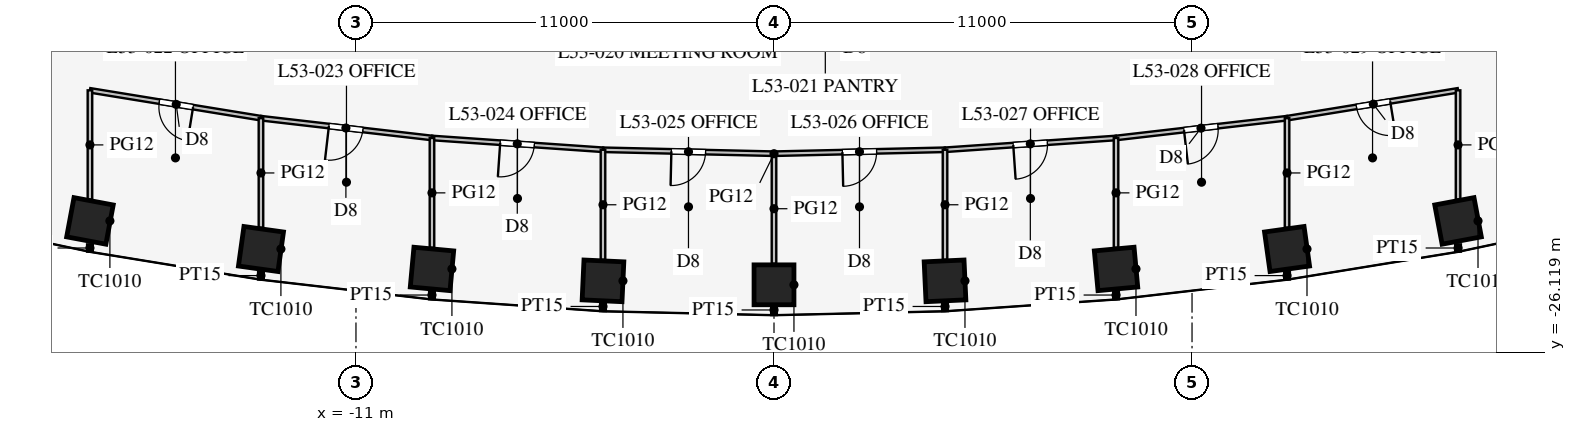
"""IFC4 building model, lengths in metres.
Left out: names, types, materials, properties, quantities, classifications, styles, units other than length and angle.
Written with IfcOpenShell. Run it as: python <this file> out.ifc"""

import sys

from ifc_helpers import new_model, si_unit, direction, frame, frame_2d, origin, origin_2d, place, context, subcontext, project, spatial, rectangle, extrude, element, fill, save


model = new_model("IFC4")
c1 = context("Model", 3, precision=1e-05, world=origin(), true_north=direction((0.0, 1.0)))
c2 = subcontext(c1, "Body", "Model", "MODEL_VIEW")
j1 = project(units=[si_unit("LENGTHUNIT", "METRE"), si_unit("PLANEANGLEUNIT", "RADIAN")], contexts=[c1])
p1 = place(None, origin())
s1 = spatial("IfcSite", under=j1, at=p1, CompositionType="ELEMENT")
p2 = place(p1, origin())
s2 = spatial("IfcBuilding", under=s1, at=p2, CompositionType="ELEMENT")
p3 = place(p2, frame((0.0, 0.0, 231.7)))
s3 = spatial("IfcBuildingStorey", under=s2, at=p3, CompositionType="ELEMENT", Elevation=231.7)
for number, where, z_axis, x_axis in (
    (1, (-18.0, -22.669, 0.0), (0.0, 0.0, 1.0), (0.983, -0.184, 0.0)),
    (2, (-13.5, -23.408, 0.0), (0.0, 0.0, 1.0), (0.99, -0.138, 0.0)),
    (3, (-9.0, -23.933, 0.0), (0.0, 0.0, 1.0), (0.996, -0.092, 0.0)),
    (4, (-4.5, -24.246, 0.0), (0.0, 0.0, 1.0), (0.999, -0.046, 0.0)),
    (5, (0.0, -24.351, 0.0), (0.0, 0.0, 1.0), (1.0, 0.0, 0.0)),
    (6, (4.5, -24.246, 0.0), (0.0, 0.0, 1.0), (0.999, 0.046, 0.0)),
    (7, (9.0, -23.933, 0.0), (0.0, 0.0, 1.0), (0.996, 0.092, 0.0)),
    (8, (13.5, -23.408, 0.0), (0.0, 0.0, 1.0), (0.99, 0.138, 0.0)),
    (9, (18.0, -22.669, 0.0), (0.0, 0.0, 1.0), (0.983, 0.184, 0.0)),
):
    element("IfcColumn", number, at=place(p3, frame(where, z_axis=z_axis, x_axis=x_axis)), inside=s3, PredefinedType="COLUMN", context=c2, shape_type="SweptSolid", body=[
        extrude(rectangle(XDim=1.05, YDim=1.05, at=origin_2d()), origin(), (0.0, 0.0, 1.0), 4.2),
    ])
p4 = place(p3, frame((13.5, -24.005, 0.0), z_axis=(0.0, 0.0, 1.0), x_axis=(0.0, -1.0, 0.0)))
e10 = element("IfcWall", 10, at=p4, inside=s3, PredefinedType="PARTITIONING", context=c2, shape_type="SweptSolid", body=[
    extrude(rectangle(XDim=0.206, YDim=0.15, at=frame_2d((0.103, 0.0))), origin(), (0.0, 0.0, 1.0), 2.9),
])
p5 = place(p3, frame((18.0, -23.286, 0.0), z_axis=(0.0, 0.0, 1.0), x_axis=(0.0, -1.0, 0.0)))
e11 = element("IfcWall", 11, at=p5, inside=s3, PredefinedType="PARTITIONING", context=c2, shape_type="SweptSolid", body=[
    extrude(rectangle(XDim=0.192, YDim=0.15, at=frame_2d((0.096, 0.0))), origin(), (0.0, 0.0, 1.0), 2.9),
])
p6 = place(p3, frame((4.5, -24.799, 0.0), z_axis=(0.0, 0.0, 1.0), x_axis=(0.0, -1.0, 0.0)))
e12 = element("IfcWall", 12, at=p6, inside=s3, PredefinedType="PARTITIONING", context=c2, shape_type="SweptSolid", body=[
    extrude(rectangle(XDim=0.243, YDim=0.15, at=frame_2d((0.122, 0.0))), origin(), (0.0, 0.0, 1.0), 2.9),
])
p7 = place(p3, frame((9.0, -24.508, 0.0), z_axis=(0.0, 0.0, 1.0), x_axis=(0.0, -1.0, 0.0)))
e13 = element("IfcWall", 13, at=p7, inside=s3, PredefinedType="PARTITIONING", context=c2, shape_type="SweptSolid", body=[
    extrude(rectangle(XDim=0.223, YDim=0.15, at=frame_2d((0.112, 0.0))), origin(), (0.0, 0.0, 1.0), 2.9),
])
p8 = place(p3, frame((0.0, -24.88, 0.0), z_axis=(0.0, 0.0, 1.0), x_axis=(0.0, -1.0, 0.0)))
e14 = element("IfcWall", 14, at=p8, inside=s3, PredefinedType="PARTITIONING", context=c2, shape_type="SweptSolid", body=[
    extrude(rectangle(XDim=0.266, YDim=0.15, at=frame_2d((0.133, 0.0))), origin(), (0.0, 0.0, 1.0), 2.9),
])
p9 = place(p3, frame((-13.5, -24.005, 0.0), z_axis=(0.0, 0.0, 1.0), x_axis=(0.0, -1.0, 0.0)))
e15 = element("IfcWall", 15, at=p9, inside=s3, PredefinedType="PARTITIONING", context=c2, shape_type="SweptSolid", body=[
    extrude(rectangle(XDim=0.206, YDim=0.15, at=frame_2d((0.103, 0.0))), origin(), (0.0, 0.0, 1.0), 2.9),
])
p10 = place(p3, frame((-18.0, -23.286, 0.0), z_axis=(0.0, 0.0, 1.0), x_axis=(0.0, -1.0, 0.0)))
e16 = element("IfcWall", 16, at=p10, inside=s3, PredefinedType="PARTITIONING", context=c2, shape_type="SweptSolid", body=[
    extrude(rectangle(XDim=0.192, YDim=0.15, at=frame_2d((0.096, 0.0))), origin(), (0.0, 0.0, 1.0), 2.9),
])
p11 = place(p3, frame((-4.5, -24.799, 0.0), z_axis=(0.0, 0.0, 1.0), x_axis=(0.0, -1.0, 0.0)))
e17 = element("IfcWall", 17, at=p11, inside=s3, PredefinedType="PARTITIONING", context=c2, shape_type="SweptSolid", body=[
    extrude(rectangle(XDim=0.243, YDim=0.15, at=frame_2d((0.122, 0.0))), origin(), (0.0, 0.0, 1.0), 2.9),
])
p12 = place(p3, frame((-9.0, -24.508, 0.0), z_axis=(0.0, 0.0, 1.0), x_axis=(0.0, -1.0, 0.0)))
e18 = element("IfcWall", 18, at=p12, inside=s3, PredefinedType="PARTITIONING", context=c2, shape_type="SweptSolid", body=[
    extrude(rectangle(XDim=0.223, YDim=0.15, at=frame_2d((0.112, 0.0))), origin(), (0.0, 0.0, 1.0), 2.9),
])
p13 = place(p3, frame((0.0, -20.901, 0.0), z_axis=(0.0, 0.0, 1.0), x_axis=(0.99973552509, 0.022997388381, 0.0)))
e19 = element("IfcWall", 19, at=p13, inside=s3, PredefinedType="PARTITIONING", context=c2, shape_type="SweptSolid", body=[
    extrude(rectangle(XDim=4.501, YDim=0.12, at=frame_2d((2.25, 0.0))), origin(), (0.0, 0.0, 1.0), 2.9),
])
p14 = place(p13, frame((1.8, 0.0, 0.15)))
e20 = element("IfcOpeningElement", 20, at=p14, cuts=e19, PredefinedType="OPENING", context=c2, shape_type="SweptSolid", body=[
    extrude(rectangle(XDim=0.9, YDim=2.1, at=frame_2d((0.45, 1.05))), frame((0.0, 0.07, 0.0), z_axis=(0.0, -1.0, 0.0), x_axis=(1.0, 0.0, 0.0)), (0.0, 0.0, 1.0), 0.14),
])
p15 = place(p3, frame((13.5, -19.966, 0.0), z_axis=(0.0, 0.0, 1.0), x_axis=(0.986986525477, 0.160802980469, 0.0)))
e21 = element("IfcWall", 21, at=p15, inside=s3, PredefinedType="PARTITIONING", context=c2, shape_type="SweptSolid", body=[
    extrude(rectangle(XDim=4.559, YDim=0.12, at=frame_2d((2.28, 0.0))), origin(), (0.0, 0.0, 1.0), 2.9),
])
p16 = place(p15, frame((1.85, 0.0, 0.15)))
e22 = element("IfcOpeningElement", 22, at=p16, cuts=e21, PredefinedType="OPENING", context=c2, shape_type="SweptSolid", body=[
    extrude(rectangle(XDim=0.9, YDim=2.1, at=frame_2d((0.45, 1.05))), frame((0.0, 0.07, 0.0), z_axis=(0.0, -1.0, 0.0), x_axis=(1.0, 0.0, 0.0)), (0.0, 0.0, 1.0), 0.14),
])
p17 = place(p3, frame((4.5, -20.797, 0.0), z_axis=(0.0, 0.0, 1.0), x_axis=(0.997623533978, 0.068900540297, 0.0)))
e23 = element("IfcWall", 23, at=p17, inside=s3, PredefinedType="PARTITIONING", context=c2, shape_type="SweptSolid", body=[
    extrude(rectangle(XDim=4.511, YDim=0.12, at=frame_2d((2.255, 0.0))), origin(), (0.0, 0.0, 1.0), 2.9),
])
p18 = place(p17, frame((1.8, 0.0, 0.15)))
e24 = element("IfcOpeningElement", 24, at=p18, cuts=e23, PredefinedType="OPENING", context=c2, shape_type="SweptSolid", body=[
    extrude(rectangle(XDim=0.9, YDim=2.1, at=frame_2d((0.45, 1.05))), frame((0.0, 0.07, 0.0), z_axis=(0.0, -1.0, 0.0), x_axis=(1.0, 0.0, 0.0)), (0.0, 0.0, 1.0), 0.14),
])
p19 = place(p3, frame((9.0, -20.486, 0.0), z_axis=(0.0, 0.0, 1.0), x_axis=(0.993382946625, 0.114849124309, 0.0)))
e25 = element("IfcWall", 25, at=p19, inside=s3, PredefinedType="PARTITIONING", context=c2, shape_type="SweptSolid", body=[
    extrude(rectangle(XDim=4.53, YDim=0.12, at=frame_2d((2.265, 0.0))), origin(), (0.0, 0.0, 1.0), 2.9),
])
p20 = place(p19, frame((1.8, 0.0, 0.15)))
e26 = element("IfcOpeningElement", 26, at=p20, cuts=e25, PredefinedType="OPENING", context=c2, shape_type="SweptSolid", body=[
    extrude(rectangle(XDim=0.9, YDim=2.1, at=frame_2d((0.45, 1.05))), frame((0.0, 0.07, 0.0), z_axis=(0.0, -1.0, 0.0), x_axis=(1.0, 0.0, 0.0)), (0.0, 0.0, 1.0), 0.14),
])
p21 = place(p3, frame((-13.5, -19.966, 0.0), z_axis=(0.0, 0.0, 1.0), x_axis=(0.993382946625, -0.114849124309, 0.0)))
e27 = element("IfcWall", 27, at=p21, inside=s3, PredefinedType="PARTITIONING", context=c2, shape_type="SweptSolid", body=[
    extrude(rectangle(XDim=4.53, YDim=0.12, at=frame_2d((2.265, 0.0))), origin(), (0.0, 0.0, 1.0), 2.9),
])
p22 = place(p21, frame((1.8, 0.0, 0.15)))
e28 = element("IfcOpeningElement", 28, at=p22, cuts=e27, PredefinedType="OPENING", context=c2, shape_type="SweptSolid", body=[
    extrude(rectangle(XDim=0.9, YDim=2.1, at=frame_2d((0.45, 1.05))), frame((0.0, 0.07, 0.0), z_axis=(0.0, -1.0, 0.0), x_axis=(1.0, 0.0, 0.0)), (0.0, 0.0, 1.0), 0.14),
])
p23 = place(p3, frame((-18.0, -19.233, 0.0), z_axis=(0.0, 0.0, 1.0), x_axis=(0.986986525477, -0.160802980469, 0.0)))
e29 = element("IfcWall", 29, at=p23, inside=s3, PredefinedType="PARTITIONING", context=c2, shape_type="SweptSolid", body=[
    extrude(rectangle(XDim=4.559, YDim=0.12, at=frame_2d((2.28, 0.0))), origin(), (0.0, 0.0, 1.0), 2.9),
])
p24 = place(p23, frame((1.85, 0.0, 0.15)))
e30 = element("IfcOpeningElement", 30, at=p24, cuts=e29, PredefinedType="OPENING", context=c2, shape_type="SweptSolid", body=[
    extrude(rectangle(XDim=0.9, YDim=2.1, at=frame_2d((0.45, 1.05))), frame((0.0, 0.07, 0.0), z_axis=(0.0, -1.0, 0.0), x_axis=(1.0, 0.0, 0.0)), (0.0, 0.0, 1.0), 0.14),
])
p25 = place(p3, frame((-4.5, -20.797, 0.0), z_axis=(0.0, 0.0, 1.0), x_axis=(0.99973552509, -0.022997388381, 0.0)))
e31 = element("IfcWall", 31, at=p25, inside=s3, PredefinedType="PARTITIONING", context=c2, shape_type="SweptSolid", body=[
    extrude(rectangle(XDim=4.501, YDim=0.12, at=frame_2d((2.25, 0.0))), origin(), (0.0, 0.0, 1.0), 2.9),
])
p26 = place(p25, frame((1.8, 0.0, 0.15)))
e32 = element("IfcOpeningElement", 32, at=p26, cuts=e31, PredefinedType="OPENING", context=c2, shape_type="SweptSolid", body=[
    extrude(rectangle(XDim=0.9, YDim=2.1, at=frame_2d((0.45, 1.05))), frame((0.0, 0.07, 0.0), z_axis=(0.0, -1.0, 0.0), x_axis=(1.0, 0.0, 0.0)), (0.0, 0.0, 1.0), 0.14),
])
p27 = place(p3, frame((-9.0, -20.486, 0.0), z_axis=(0.0, 0.0, 1.0), x_axis=(0.997623533978, -0.068900540297, 0.0)))
e33 = element("IfcWall", 33, at=p27, inside=s3, PredefinedType="PARTITIONING", context=c2, shape_type="SweptSolid", body=[
    extrude(rectangle(XDim=4.511, YDim=0.12, at=frame_2d((2.255, 0.0))), origin(), (0.0, 0.0, 1.0), 2.9),
])
p28 = place(p27, frame((1.8, 0.0, 0.15)))
e34 = element("IfcOpeningElement", 34, at=p28, cuts=e33, PredefinedType="OPENING", context=c2, shape_type="SweptSolid", body=[
    extrude(rectangle(XDim=0.9, YDim=2.1, at=frame_2d((0.45, 1.05))), frame((0.0, 0.07, 0.0), z_axis=(0.0, -1.0, 0.0), x_axis=(1.0, 0.0, 0.0)), (0.0, 0.0, 1.0), 0.14),
])
p29 = place(p3, frame((0.0, -20.901, 0.0), z_axis=(0.0, 0.0, 1.0), x_axis=(0.0, -1.0, 0.0)))
e35 = element("IfcWall", 35, at=p29, inside=s3, PredefinedType="PARTITIONING", context=c2, shape_type="SweptSolid", body=[
    extrude(rectangle(XDim=2.895, YDim=0.12, at=frame_2d((1.448, 0.0))), origin(), (0.0, 0.0, 1.0), 2.9),
])
p30 = place(p3, frame((13.5, -19.966, 0.0), z_axis=(0.0, 0.0, 1.0), x_axis=(0.0, -1.0, 0.0)))
e36 = element("IfcWall", 36, at=p30, inside=s3, PredefinedType="PARTITIONING", context=c2, shape_type="SweptSolid", body=[
    extrude(rectangle(XDim=2.882, YDim=0.12, at=frame_2d((1.441, 0.0))), origin(), (0.0, 0.0, 1.0), 2.9),
])
p31 = place(p3, frame((18.0, -19.233, 0.0), z_axis=(0.0, 0.0, 1.0), x_axis=(0.0, -1.0, 0.0)))
e37 = element("IfcWall", 37, at=p31, inside=s3, PredefinedType="PARTITIONING", context=c2, shape_type="SweptSolid", body=[
    extrude(rectangle(XDim=2.872, YDim=0.12, at=frame_2d((1.436, 0.0))), origin(), (0.0, 0.0, 1.0), 2.9),
])
p32 = place(p3, frame((4.5, -20.797, 0.0), z_axis=(0.0, 0.0, 1.0), x_axis=(0.0, -1.0, 0.0)))
e38 = element("IfcWall", 38, at=p32, inside=s3, PredefinedType="PARTITIONING", context=c2, shape_type="SweptSolid", body=[
    extrude(rectangle(XDim=2.894, YDim=0.12, at=frame_2d((1.447, 0.0))), origin(), (0.0, 0.0, 1.0), 2.9),
])
p33 = place(p3, frame((9.0, -20.486, 0.0), z_axis=(0.0, 0.0, 1.0), x_axis=(0.0, -1.0, 0.0)))
e39 = element("IfcWall", 39, at=p33, inside=s3, PredefinedType="PARTITIONING", context=c2, shape_type="SweptSolid", body=[
    extrude(rectangle(XDim=2.889, YDim=0.12, at=frame_2d((1.445, 0.0))), origin(), (0.0, 0.0, 1.0), 2.9),
])
p34 = place(p3, frame((-13.5, -19.966, 0.0), z_axis=(0.0, 0.0, 1.0), x_axis=(0.0, -1.0, 0.0)))
e40 = element("IfcWall", 40, at=p34, inside=s3, PredefinedType="PARTITIONING", context=c2, shape_type="SweptSolid", body=[
    extrude(rectangle(XDim=2.882, YDim=0.12, at=frame_2d((1.441, 0.0))), origin(), (0.0, 0.0, 1.0), 2.9),
])
p35 = place(p3, frame((-18.0, -19.233, 0.0), z_axis=(0.0, 0.0, 1.0), x_axis=(0.0, -1.0, 0.0)))
e41 = element("IfcWall", 41, at=p35, inside=s3, PredefinedType="PARTITIONING", context=c2, shape_type="SweptSolid", body=[
    extrude(rectangle(XDim=2.872, YDim=0.12, at=frame_2d((1.436, 0.0))), origin(), (0.0, 0.0, 1.0), 2.9),
])
p36 = place(p3, frame((-4.5, -20.797, 0.0), z_axis=(0.0, 0.0, 1.0), x_axis=(0.0, -1.0, 0.0)))
e42 = element("IfcWall", 42, at=p36, inside=s3, PredefinedType="PARTITIONING", context=c2, shape_type="SweptSolid", body=[
    extrude(rectangle(XDim=2.894, YDim=0.12, at=frame_2d((1.447, 0.0))), origin(), (0.0, 0.0, 1.0), 2.9),
])
p37 = place(p3, frame((-9.0, -20.486, 0.0), z_axis=(0.0, 0.0, 1.0), x_axis=(0.0, -1.0, 0.0)))
e43 = element("IfcWall", 43, at=p37, inside=s3, PredefinedType="PARTITIONING", context=c2, shape_type="SweptSolid", body=[
    extrude(rectangle(XDim=2.889, YDim=0.12, at=frame_2d((1.445, 0.0))), origin(), (0.0, 0.0, 1.0), 2.9),
])
p38 = place(p24, frame((0.9, 0.0, 0.0), z_axis=(0.0, 0.0, 1.0), x_axis=(-1.0, 0.0, 0.0)))
e44 = element("IfcDoor", 44, at=p38, inside=s3, OperationType="SINGLE_SWING_LEFT", PredefinedType="DOOR", context=c2, shape_type="SweptSolid", body=[
    extrude(rectangle(XDim=0.9, YDim=2.1, at=frame_2d((0.45, 1.05))), frame((0.0, 0.025, 0.0), z_axis=(0.0, -1.0, 0.0), x_axis=(1.0, 0.0, 0.0)), (0.0, 0.0, 1.0), 0.05),
])
fill(e30, e44)
p39 = place(p22, frame((0.9, 0.0, 0.0), z_axis=(0.0, 0.0, 1.0), x_axis=(-1.0, 0.0, 0.0)))
e45 = element("IfcDoor", 45, at=p39, inside=s3, OperationType="SINGLE_SWING_RIGHT", PredefinedType="DOOR", context=c2, shape_type="SweptSolid", body=[
    extrude(rectangle(XDim=0.9, YDim=2.1, at=frame_2d((0.45, 1.05))), frame((0.0, 0.025, 0.0), z_axis=(0.0, -1.0, 0.0), x_axis=(1.0, 0.0, 0.0)), (0.0, 0.0, 1.0), 0.05),
])
fill(e28, e45)
p40 = place(p28, frame((0.9, 0.0, 0.0), z_axis=(0.0, 0.0, 1.0), x_axis=(-1.0, 0.0, 0.0)))
e46 = element("IfcDoor", 46, at=p40, inside=s3, OperationType="SINGLE_SWING_RIGHT", PredefinedType="DOOR", context=c2, shape_type="SweptSolid", body=[
    extrude(rectangle(XDim=0.9, YDim=2.1, at=frame_2d((0.45, 1.05))), frame((0.0, 0.025, 0.0), z_axis=(0.0, -1.0, 0.0), x_axis=(1.0, 0.0, 0.0)), (0.0, 0.0, 1.0), 0.05),
])
fill(e34, e46)
p41 = place(p26, frame((0.9, 0.0, 0.0), z_axis=(0.0, 0.0, 1.0), x_axis=(-1.0, 0.0, 0.0)))
e47 = element("IfcDoor", 47, at=p41, inside=s3, OperationType="SINGLE_SWING_RIGHT", PredefinedType="DOOR", context=c2, shape_type="SweptSolid", body=[
    extrude(rectangle(XDim=0.9, YDim=2.1, at=frame_2d((0.45, 1.05))), frame((0.0, 0.025, 0.0), z_axis=(0.0, -1.0, 0.0), x_axis=(1.0, 0.0, 0.0)), (0.0, 0.0, 1.0), 0.05),
])
fill(e32, e47)
p42 = place(p14, frame((0.9, 0.0, 0.0), z_axis=(0.0, 0.0, 1.0), x_axis=(-1.0, 0.0, 0.0)))
e48 = element("IfcDoor", 48, at=p42, inside=s3, OperationType="SINGLE_SWING_RIGHT", PredefinedType="DOOR", context=c2, shape_type="SweptSolid", body=[
    extrude(rectangle(XDim=0.9, YDim=2.1, at=frame_2d((0.45, 1.05))), frame((0.0, 0.025, 0.0), z_axis=(0.0, -1.0, 0.0), x_axis=(1.0, 0.0, 0.0)), (0.0, 0.0, 1.0), 0.05),
])
fill(e20, e48)
p43 = place(p18, frame((0.9, 0.0, 0.0), z_axis=(0.0, 0.0, 1.0), x_axis=(-1.0, 0.0, 0.0)))
e49 = element("IfcDoor", 49, at=p43, inside=s3, OperationType="SINGLE_SWING_RIGHT", PredefinedType="DOOR", context=c2, shape_type="SweptSolid", body=[
    extrude(rectangle(XDim=0.9, YDim=2.1, at=frame_2d((0.45, 1.05))), frame((0.0, 0.025, 0.0), z_axis=(0.0, -1.0, 0.0), x_axis=(1.0, 0.0, 0.0)), (0.0, 0.0, 1.0), 0.05),
])
fill(e24, e49)
p44 = place(p20, frame((0.9, 0.0, 0.0), z_axis=(0.0, 0.0, 1.0), x_axis=(-1.0, 0.0, 0.0)))
e50 = element("IfcDoor", 50, at=p44, inside=s3, OperationType="SINGLE_SWING_RIGHT", PredefinedType="DOOR", context=c2, shape_type="SweptSolid", body=[
    extrude(rectangle(XDim=0.9, YDim=2.1, at=frame_2d((0.45, 1.05))), frame((0.0, 0.025, 0.0), z_axis=(0.0, -1.0, 0.0), x_axis=(1.0, 0.0, 0.0)), (0.0, 0.0, 1.0), 0.05),
])
fill(e26, e50)
p45 = place(p16, frame((0.9, 0.0, 0.0), z_axis=(0.0, 0.0, 1.0), x_axis=(-1.0, 0.0, 0.0)))
e51 = element("IfcDoor", 51, at=p45, inside=s3, OperationType="SINGLE_SWING_LEFT", PredefinedType="DOOR", context=c2, shape_type="SweptSolid", body=[
    extrude(rectangle(XDim=0.9, YDim=2.1, at=frame_2d((0.45, 1.05))), frame((0.0, 0.025, 0.0), z_axis=(0.0, -1.0, 0.0), x_axis=(1.0, 0.0, 0.0)), (0.0, 0.0, 1.0), 0.05),
])
fill(e22, e51)
save(model, sys.argv[1])
